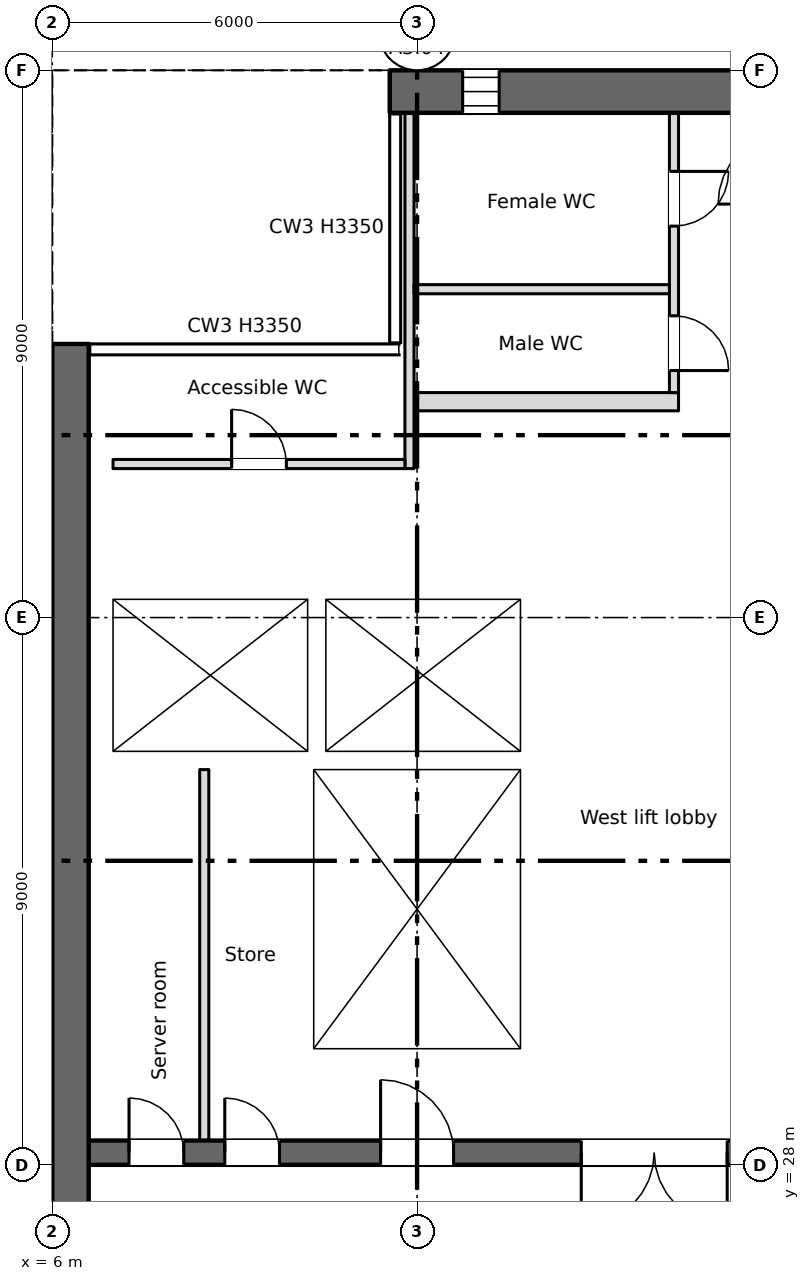
"""IFC4 building model, lengths in metres.
Left out: names, types, materials, properties, quantities, classifications, styles, units other than length and angle.
Written with IfcOpenShell. Run it as: python <this file> out.ifc"""

import sys

from ifc_helpers import new_model, si_unit, direction, frame, frame_2d, origin, place, context, subcontext, project, spatial, rectangle, extrude, element, fill, save


model = new_model("IFC4")
c1 = context("Model", 3, precision=1e-05, world=origin(), true_north=direction((0.0, 1.0)))
c2 = subcontext(c1, "Body", "Model", "MODEL_VIEW")
j1 = project(units=[si_unit("LENGTHUNIT", "METRE"), si_unit("PLANEANGLEUNIT", "RADIAN")], contexts=[c1])
p1 = place(None, origin())
s1 = spatial("IfcSite", under=j1, at=p1, CompositionType="ELEMENT")
p2 = place(p1, origin())
s2 = spatial("IfcBuilding", under=s1, at=p2, CompositionType="ELEMENT")
p3 = place(p2, frame((0.0, 0.0, 189.25)))
s3 = spatial("IfcBuildingStorey", under=s2, at=p3, CompositionType="ELEMENT", Elevation=189.25)
p4 = place(p3, frame((6.3, 7.5, 0.0), z_axis=(0.0, 0.0, 1.0), x_axis=(0.0, 1.0, 0.0)))
e1 = element("IfcWall", 1, at=p4, inside=s3, PredefinedType="SHEAR", context=c2, shape_type="SweptSolid", body=[
    extrude(rectangle(XDim=34.0, YDim=0.6, at=frame_2d((17.0, 0.0))), origin(), (0.0, 0.0, 1.0), 3.35),
])
p5 = place(p4, frame((1.2, 0.0, 0.6)))
e2 = element("IfcOpeningElement", 2, at=p5, cuts=e1, PredefinedType="OPENING", context=c2, shape_type="SweptSolid", body=[
    extrude(rectangle(XDim=0.6, YDim=2.4, at=frame_2d((0.3, 1.2))), frame((0.0, 0.31, 0.0), z_axis=(0.0, -1.0, 0.0), x_axis=(1.0, 0.0, 0.0)), (0.0, 0.0, 1.0), 0.62),
])
p6 = place(p4, frame((7.2, 0.0, 0.6)))
e3 = element("IfcOpeningElement", 3, at=p6, cuts=e1, PredefinedType="OPENING", context=c2, shape_type="SweptSolid", body=[
    extrude(rectangle(XDim=0.6, YDim=2.4, at=frame_2d((0.3, 1.2))), frame((0.0, 0.31, 0.0), z_axis=(0.0, -1.0, 0.0), x_axis=(1.0, 0.0, 0.0)), (0.0, 0.0, 1.0), 0.62),
])
p7 = place(p4, frame((13.2, 0.0, 0.6)))
e4 = element("IfcOpeningElement", 4, at=p7, cuts=e1, PredefinedType="OPENING", context=c2, shape_type="SweptSolid", body=[
    extrude(rectangle(XDim=0.6, YDim=2.4, at=frame_2d((0.3, 1.2))), frame((0.0, 0.31, 0.0), z_axis=(0.0, -1.0, 0.0), x_axis=(1.0, 0.0, 0.0)), (0.0, 0.0, 1.0), 0.62),
])
p8 = place(p4, frame((19.2, 0.0, 0.6)))
e5 = element("IfcOpeningElement", 5, at=p8, cuts=e1, PredefinedType="OPENING", context=c2, shape_type="SweptSolid", body=[
    extrude(rectangle(XDim=0.6, YDim=2.4, at=frame_2d((0.3, 1.2))), frame((0.0, 0.31, 0.0), z_axis=(0.0, -1.0, 0.0), x_axis=(1.0, 0.0, 0.0)), (0.0, 0.0, 1.0), 0.62),
])
p9 = place(p3, frame((11.55, 45.65, 0.0), z_axis=(0.0, 0.0, 1.0), x_axis=(1.0, 0.0, 0.0)))
e6 = element("IfcWall", 6, at=p9, inside=s3, PredefinedType="SHEAR", context=c2, shape_type="SweptSolid", body=[
    extrude(rectangle(XDim=54.9, YDim=0.7, at=frame_2d((27.45, 0.0))), origin(), (0.0, 0.0, 1.0), 3.35),
])
p10 = place(p9, frame((1.2, 0.0, 0.6)))
e7 = element("IfcOpeningElement", 7, at=p10, cuts=e6, PredefinedType="OPENING", context=c2, shape_type="SweptSolid", body=[
    extrude(rectangle(XDim=0.6, YDim=2.4, at=frame_2d((0.3, 1.2))), frame((0.0, 0.36, 0.0), z_axis=(0.0, -1.0, 0.0), x_axis=(1.0, 0.0, 0.0)), (0.0, 0.0, 1.0), 0.72),
])
p11 = place(p9, frame((49.2, 0.0, 0.6)))
e8 = element("IfcOpeningElement", 8, at=p11, cuts=e6, PredefinedType="OPENING", context=c2, shape_type="SweptSolid", body=[
    extrude(rectangle(XDim=0.6, YDim=2.4, at=frame_2d((0.3, 1.2))), frame((0.0, 0.36, 0.0), z_axis=(0.0, -1.0, 0.0), x_axis=(1.0, 0.0, 0.0)), (0.0, 0.0, 1.0), 0.72),
])
p12 = place(p3, frame((6.6, 28.2, 0.0), z_axis=(0.0, 0.0, 1.0), x_axis=(1.0, 0.0, 0.0)))
e9 = element("IfcWall", 9, at=p12, inside=s3, PredefinedType="SHEAR", context=c2, shape_type="SweptSolid", body=[
    extrude(rectangle(XDim=57.9, YDim=0.4, at=frame_2d((28.95, 0.0))), origin(), (0.0, 0.0, 1.0), 3.35),
])
p13 = place(p12, frame((12.913, 0.0, 0.0)))
e10 = element("IfcOpeningElement", 10, at=p13, cuts=e9, PredefinedType="OPENING", context=c2, shape_type="SweptSolid", body=[
    extrude(rectangle(XDim=0.9, YDim=2.1, at=frame_2d((0.45, 1.05))), frame((0.0, 0.21, 0.0), z_axis=(0.0, -1.0, 0.0), x_axis=(1.0, 0.0, 0.0)), (0.0, 0.0, 1.0), 0.42),
])
p14 = place(p12, frame((15.488, 0.0, 0.0)))
e11 = element("IfcOpeningElement", 11, at=p14, cuts=e9, PredefinedType="OPENING", context=c2, shape_type="SweptSolid", body=[
    extrude(rectangle(XDim=0.9, YDim=2.1, at=frame_2d((0.45, 1.05))), frame((0.0, 0.21, 0.0), z_axis=(0.0, -1.0, 0.0), x_axis=(1.0, 0.0, 0.0)), (0.0, 0.0, 1.0), 0.42),
])
p15 = place(p12, frame((48.413, 0.0, 0.0)))
e12 = element("IfcOpeningElement", 12, at=p15, cuts=e9, PredefinedType="OPENING", context=c2, shape_type="SweptSolid", body=[
    extrude(rectangle(XDim=0.9, YDim=2.1, at=frame_2d((0.45, 1.05))), frame((0.0, 0.21, 0.0), z_axis=(0.0, -1.0, 0.0), x_axis=(1.0, 0.0, 0.0)), (0.0, 0.0, 1.0), 0.42),
])
p16 = place(p12, frame((50.988, 0.0, 0.0)))
e13 = element("IfcOpeningElement", 13, at=p16, cuts=e9, PredefinedType="OPENING", context=c2, shape_type="SweptSolid", body=[
    extrude(rectangle(XDim=0.9, YDim=2.1, at=frame_2d((0.45, 1.05))), frame((0.0, 0.21, 0.0), z_axis=(0.0, -1.0, 0.0), x_axis=(1.0, 0.0, 0.0)), (0.0, 0.0, 1.0), 0.42),
])
p17 = place(p12, frame((0.663, 0.0, 0.0)))
e14 = element("IfcOpeningElement", 14, at=p17, cuts=e9, PredefinedType="OPENING", context=c2, shape_type="SweptSolid", body=[
    extrude(rectangle(XDim=0.9, YDim=2.1, at=frame_2d((0.45, 1.05))), frame((0.0, 0.21, 0.0), z_axis=(0.0, -1.0, 0.0), x_axis=(1.0, 0.0, 0.0)), (0.0, 0.0, 1.0), 0.42),
])
p18 = place(p12, frame((2.238, 0.0, 0.0)))
e15 = element("IfcOpeningElement", 15, at=p18, cuts=e9, PredefinedType="OPENING", context=c2, shape_type="SweptSolid", body=[
    extrude(rectangle(XDim=0.9, YDim=2.1, at=frame_2d((0.45, 1.05))), frame((0.0, 0.21, 0.0), z_axis=(0.0, -1.0, 0.0), x_axis=(1.0, 0.0, 0.0)), (0.0, 0.0, 1.0), 0.42),
])
p19 = place(p12, frame((4.8, 0.0, 0.0)))
e16 = element("IfcOpeningElement", 16, at=p19, cuts=e9, PredefinedType="OPENING", context=c2, shape_type="SweptSolid", body=[
    extrude(rectangle(XDim=1.2, YDim=2.1, at=frame_2d((0.6, 1.05))), frame((0.0, 0.21, 0.0), z_axis=(0.0, -1.0, 0.0), x_axis=(1.0, 0.0, 0.0)), (0.0, 0.0, 1.0), 0.42),
])
p20 = place(p12, frame((31.8, 0.0, 0.0)))
e17 = element("IfcOpeningElement", 17, at=p20, cuts=e9, PredefinedType="OPENING", context=c2, shape_type="SweptSolid", body=[
    extrude(rectangle(XDim=1.2, YDim=2.1, at=frame_2d((0.6, 1.05))), frame((0.0, 0.21, 0.0), z_axis=(0.0, -1.0, 0.0), x_axis=(1.0, 0.0, 0.0)), (0.0, 0.0, 1.0), 0.42),
])
p21 = place(p12, frame((55.3, 0.0, 0.0)))
e18 = element("IfcOpeningElement", 18, at=p21, cuts=e9, PredefinedType="OPENING", context=c2, shape_type="SweptSolid", body=[
    extrude(rectangle(XDim=1.2, YDim=2.1, at=frame_2d((0.6, 1.05))), frame((0.0, 0.21, 0.0), z_axis=(0.0, -1.0, 0.0), x_axis=(1.0, 0.0, 0.0)), (0.0, 0.0, 1.0), 0.42),
])
p22 = place(p12, frame((21.8, 0.0, 0.0)))
e19 = element("IfcOpeningElement", 19, at=p22, cuts=e9, PredefinedType="OPENING", context=c2, shape_type="SweptSolid", body=[
    extrude(rectangle(XDim=1.2, YDim=2.1, at=frame_2d((0.6, 1.05))), frame((0.0, 0.21, 0.0), z_axis=(0.0, -1.0, 0.0), x_axis=(1.0, 0.0, 0.0)), (0.0, 0.0, 1.0), 0.42),
])
p23 = place(p12, frame((41.8, 0.0, 0.0)))
e20 = element("IfcOpeningElement", 20, at=p23, cuts=e9, PredefinedType="OPENING", context=c2, shape_type="SweptSolid", body=[
    extrude(rectangle(XDim=1.2, YDim=2.1, at=frame_2d((0.6, 1.05))), frame((0.0, 0.21, 0.0), z_axis=(0.0, -1.0, 0.0), x_axis=(1.0, 0.0, 0.0)), (0.0, 0.0, 1.0), 0.42),
])
p24 = place(p12, frame((24.95, 0.0, 0.0)))
e21 = element("IfcOpeningElement", 21, at=p24, cuts=e9, PredefinedType="OPENING", context=c2, shape_type="SweptSolid", body=[
    extrude(rectangle(XDim=2.4, YDim=2.1, at=frame_2d((1.2, 1.05))), frame((0.0, 0.21, 0.0), z_axis=(0.0, -1.0, 0.0), x_axis=(1.0, 0.0, 0.0)), (0.0, 0.0, 1.0), 0.42),
])
p25 = place(p12, frame((37.45, 0.0, 0.0)))
e22 = element("IfcOpeningElement", 22, at=p25, cuts=e9, PredefinedType="OPENING", context=c2, shape_type="SweptSolid", body=[
    extrude(rectangle(XDim=2.4, YDim=2.1, at=frame_2d((1.2, 1.05))), frame((0.0, 0.21, 0.0), z_axis=(0.0, -1.0, 0.0), x_axis=(1.0, 0.0, 0.0)), (0.0, 0.0, 1.0), 0.42),
])
p26 = place(p12, frame((8.1, 0.0, 0.0)))
e23 = element("IfcOpeningElement", 23, at=p26, cuts=e9, PredefinedType="OPENING", context=c2, shape_type="SweptSolid", body=[
    extrude(rectangle(XDim=2.4, YDim=2.1, at=frame_2d((1.2, 1.05))), frame((0.0, 0.21, 0.0), z_axis=(0.0, -1.0, 0.0), x_axis=(1.0, 0.0, 0.0)), (0.0, 0.0, 1.0), 0.42),
])
p27 = place(p12, frame((28.95, 0.0, 0.0)))
e24 = element("IfcOpeningElement", 24, at=p27, cuts=e9, PredefinedType="OPENING", context=c2, shape_type="SweptSolid", body=[
    extrude(rectangle(XDim=0.9, YDim=2.1, at=frame_2d((0.45, 1.05))), frame((0.0, 0.21, 0.0), z_axis=(0.0, -1.0, 0.0), x_axis=(1.0, 0.0, 0.0)), (0.0, 0.0, 1.0), 0.42),
])
p28 = place(p12, frame((34.95, 0.0, 0.0)))
e25 = element("IfcOpeningElement", 25, at=p28, cuts=e9, PredefinedType="OPENING", context=c2, shape_type="SweptSolid", body=[
    extrude(rectangle(XDim=0.9, YDim=2.1, at=frame_2d((0.45, 1.05))), frame((0.0, 0.21, 0.0), z_axis=(0.0, -1.0, 0.0), x_axis=(1.0, 0.0, 0.0)), (0.0, 0.0, 1.0), 0.42),
])
p29 = place(p3, frame((6.8, 28.4, 0.0), z_axis=(0.0, 0.0, 1.0), x_axis=(0.0, 1.0, 0.0)))
e26 = element("IfcWall", 26, at=p29, inside=s3, PredefinedType="SHEAR", context=c2, shape_type="SweptSolid", body=[
    extrude(rectangle(XDim=12.85, YDim=0.4, at=frame_2d((6.425, 0.0))), origin(), (0.0, 0.0, 1.0), 3.35),
])
for number, where, z_axis, x_axis in (
    (27, (10.15, 28.4, 0.0), (0.0, 0.0, 1.0), (0.0, 1.0, 0.0)),
    (28, (13.85, 28.4, 0.0), (0.0, 0.0, 1.0), (0.0, 1.0, 0.0)),
):
    element("IfcWall", number, at=place(p3, frame(where, z_axis=z_axis, x_axis=x_axis)), inside=s3, PredefinedType="SHEAR", context=c2, shape_type="SweptSolid", body=[
        extrude(rectangle(XDim=6.1, YDim=0.3, at=frame_2d((3.05, 0.0))), origin(), (0.0, 0.0, 1.0), 3.35),
    ])
for number, where, z_axis, x_axis in (
    (29, (7.0, 34.65, 0.0), (0.0, 0.0, 1.0), (1.0, 0.0, 0.0)),
    (30, (7.0, 37.45, 0.0), (0.0, 0.0, 1.0), (1.0, 0.0, 0.0)),
):
    element("IfcWall", number, at=place(p3, frame(where, z_axis=z_axis, x_axis=x_axis)), inside=s3, PredefinedType="SHEAR", context=c2, shape_type="SweptSolid", body=[
        extrude(rectangle(XDim=7.0, YDim=0.3, at=frame_2d((3.5, 0.0))), origin(), (0.0, 0.0, 1.0), 3.35),
    ])
p30 = place(p3, frame((13.85, 34.8, 0.0), z_axis=(0.0, 0.0, 1.0), x_axis=(0.0, 1.0, 0.0)))
e31 = element("IfcWall", 31, at=p30, inside=s3, PredefinedType="SHEAR", context=c2, shape_type="SweptSolid", body=[
    extrude(rectangle(XDim=2.5, YDim=0.3, at=frame_2d((1.25, 0.0))), origin(), (0.0, 0.0, 1.0), 3.35),
])
p31 = place(p3, frame((11.95, 40.55, 0.0), z_axis=(0.0, 0.0, 1.0), x_axis=(1.0, 0.0, 0.0)))
e32 = element("IfcWall", 32, at=p31, inside=s3, PredefinedType="PARTITIONING", context=c2, shape_type="SweptSolid", body=[
    extrude(rectangle(XDim=4.35, YDim=0.3, at=frame_2d((2.175, 0.0))), origin(), (0.0, 0.0, 1.0), 3.35),
])
p32 = place(p3, frame((10.35, 34.8, 0.0), z_axis=(0.0, 0.0, 1.0), x_axis=(0.0, 1.0, 0.0)))
e33 = element("IfcWall", 33, at=p32, inside=s3, PredefinedType="SHEAR", context=c2, shape_type="SweptSolid", body=[
    extrude(rectangle(XDim=2.5, YDim=0.3, at=frame_2d((1.25, 0.0))), origin(), (0.0, 0.0, 1.0), 3.35),
])
p33 = place(p3, frame((16.225, 45.3, 0.0), z_axis=(0.0, 0.0, 1.0), x_axis=(0.0, -1.0, 0.0)))
e34 = element("IfcWall", 34, at=p33, inside=s3, PredefinedType="PARTITIONING", context=c2, shape_type="SweptSolid", body=[
    extrude(rectangle(XDim=4.6, YDim=0.15, at=frame_2d((2.3, 0.0))), origin(), (0.0, 0.0, 1.0), 3.35),
])
p34 = place(p33, frame((3.337, 0.0, 0.0)))
e35 = element("IfcOpeningElement", 35, at=p34, cuts=e34, PredefinedType="OPENING", context=c2, shape_type="SweptSolid", body=[
    extrude(rectangle(XDim=0.9, YDim=2.1, at=frame_2d((0.45, 1.05))), frame((0.0, 0.085, 0.0), z_axis=(0.0, -1.0, 0.0), x_axis=(1.0, 0.0, 0.0)), (0.0, 0.0, 1.0), 0.17),
])
p35 = place(p33, frame((0.962, 0.0, 0.0)))
e36 = element("IfcOpeningElement", 36, at=p35, cuts=e34, PredefinedType="OPENING", context=c2, shape_type="SweptSolid", body=[
    extrude(rectangle(XDim=0.9, YDim=2.1, at=frame_2d((0.45, 1.05))), frame((0.0, 0.085, 0.0), z_axis=(0.0, -1.0, 0.0), x_axis=(1.0, 0.0, 0.0)), (0.0, 0.0, 1.0), 0.17),
])
p36 = place(p3, frame((8.5, 28.4, 0.0), z_axis=(0.0, 0.0, 1.0), x_axis=(0.0, 1.0, 0.0)))
e37 = element("IfcWall", 37, at=p36, inside=s3, PredefinedType="PARTITIONING", context=c2, shape_type="SweptSolid", body=[
    extrude(rectangle(XDim=6.1, YDim=0.15, at=frame_2d((3.05, 0.0))), origin(), (0.0, 0.0, 1.0), 3.35),
])
p37 = place(p3, frame((11.875, 39.45, 0.0), z_axis=(0.0, 0.0, 1.0), x_axis=(0.0, 1.0, 0.0)))
e38 = element("IfcWall", 38, at=p37, inside=s3, PredefinedType="PARTITIONING", context=c2, shape_type="SweptSolid", body=[
    extrude(rectangle(XDim=5.85, YDim=0.15, at=frame_2d((2.925, 0.0))), origin(), (0.0, 0.0, 1.0), 3.35),
])
p38 = place(p3, frame((7.0, 39.525, 0.0), z_axis=(0.0, 0.0, 1.0), x_axis=(1.0, 0.0, 0.0)))
e39 = element("IfcWall", 39, at=p38, inside=s3, PredefinedType="PARTITIONING", context=c2, shape_type="SweptSolid", body=[
    extrude(rectangle(XDim=4.8, YDim=0.15, at=frame_2d((2.4, 0.0))), origin(), (0.0, 0.0, 1.0), 3.35),
])
p39 = place(p38, frame((1.95, 0.0, 0.0)))
e40 = element("IfcOpeningElement", 40, at=p39, cuts=e39, PredefinedType="OPENING", context=c2, shape_type="SweptSolid", body=[
    extrude(rectangle(XDim=0.9, YDim=2.1, at=frame_2d((0.45, 1.05))), frame((0.0, 0.085, 0.0), z_axis=(0.0, -1.0, 0.0), x_axis=(1.0, 0.0, 0.0)), (0.0, 0.0, 1.0), 0.17),
])
p40 = place(p3, frame((11.95, 42.4, 0.0), z_axis=(0.0, 0.0, 1.0), x_axis=(1.0, 0.0, 0.0)))
e41 = element("IfcWall", 41, at=p40, inside=s3, PredefinedType="PARTITIONING", context=c2, shape_type="SweptSolid", body=[
    extrude(rectangle(XDim=4.2, YDim=0.15, at=frame_2d((2.1, 0.0))), origin(), (0.0, 0.0, 1.0), 3.35),
])
p41 = place(p10, origin())
e42 = element("IfcWindow", 42, at=p41, inside=s3, PartitioningType="SINGLE_PANEL", PredefinedType="WINDOW", context=c2, shape_type="SweptSolid", body=[
    extrude(rectangle(XDim=0.6, YDim=2.4, at=frame_2d((0.3, 1.2))), frame((0.0, 0.03, 0.0), z_axis=(0.0, -1.0, 0.0), x_axis=(1.0, 0.0, 0.0)), (0.0, 0.0, 1.0), 0.06),
])
fill(e7, e42)
p42 = place(p17, origin())
e43 = element("IfcDoor", 43, at=p42, inside=s3, OperationType="SINGLE_SWING_LEFT", PredefinedType="DOOR", context=c2, shape_type="SweptSolid", body=[
    extrude(rectangle(XDim=0.9, YDim=2.1, at=frame_2d((0.45, 1.05))), frame((0.0, 0.025, 0.0), z_axis=(0.0, -1.0, 0.0), x_axis=(1.0, 0.0, 0.0)), (0.0, 0.0, 1.0), 0.05),
])
fill(e14, e43)
p43 = place(p18, origin())
e44 = element("IfcDoor", 44, at=p43, inside=s3, OperationType="SINGLE_SWING_LEFT", PredefinedType="DOOR", context=c2, shape_type="SweptSolid", body=[
    extrude(rectangle(XDim=0.9, YDim=2.1, at=frame_2d((0.45, 1.05))), frame((0.0, 0.025, 0.0), z_axis=(0.0, -1.0, 0.0), x_axis=(1.0, 0.0, 0.0)), (0.0, 0.0, 1.0), 0.05),
])
fill(e15, e44)
p44 = place(p39, origin())
e45 = element("IfcDoor", 45, at=p44, inside=s3, OperationType="SINGLE_SWING_LEFT", PredefinedType="DOOR", context=c2, shape_type="SweptSolid", body=[
    extrude(rectangle(XDim=0.9, YDim=2.1, at=frame_2d((0.45, 1.05))), frame((0.0, 0.025, 0.0), z_axis=(0.0, -1.0, 0.0), x_axis=(1.0, 0.0, 0.0)), (0.0, 0.0, 1.0), 0.05),
])
fill(e40, e45)
p45 = place(p34, origin())
e46 = element("IfcDoor", 46, at=p45, inside=s3, OperationType="SINGLE_SWING_RIGHT", PredefinedType="DOOR", context=c2, shape_type="SweptSolid", body=[
    extrude(rectangle(XDim=0.9, YDim=2.1, at=frame_2d((0.45, 1.05))), frame((0.0, 0.025, 0.0), z_axis=(0.0, -1.0, 0.0), x_axis=(1.0, 0.0, 0.0)), (0.0, 0.0, 1.0), 0.05),
])
fill(e35, e46)
p46 = place(p35, origin())
e47 = element("IfcDoor", 47, at=p46, inside=s3, OperationType="SINGLE_SWING_LEFT", PredefinedType="DOOR", context=c2, shape_type="SweptSolid", body=[
    extrude(rectangle(XDim=0.9, YDim=2.1, at=frame_2d((0.45, 1.05))), frame((0.0, 0.025, 0.0), z_axis=(0.0, -1.0, 0.0), x_axis=(1.0, 0.0, 0.0)), (0.0, 0.0, 1.0), 0.05),
])
fill(e36, e47)
p47 = place(p19, origin())
e48 = element("IfcDoor", 48, at=p47, inside=s3, OperationType="SINGLE_SWING_LEFT", PredefinedType="DOOR", context=c2, shape_type="SweptSolid", body=[
    extrude(rectangle(XDim=1.2, YDim=2.1, at=frame_2d((0.6, 1.05))), frame((0.0, 0.025, 0.0), z_axis=(0.0, -1.0, 0.0), x_axis=(1.0, 0.0, 0.0)), (0.0, 0.0, 1.0), 0.05),
])
fill(e16, e48)
p48 = place(p26, origin())
e49 = element("IfcDoor", 49, at=p48, inside=s3, OperationType="DOUBLE_DOOR_SINGLE_SWING", PredefinedType="DOOR", context=c2, shape_type="SweptSolid", body=[
    extrude(rectangle(XDim=2.4, YDim=2.1, at=frame_2d((1.2, 1.05))), frame((0.0, 0.025, 0.0), z_axis=(0.0, -1.0, 0.0), x_axis=(1.0, 0.0, 0.0)), (0.0, 0.0, 1.0), 0.05),
])
fill(e23, e49)
save(model, sys.argv[1])
